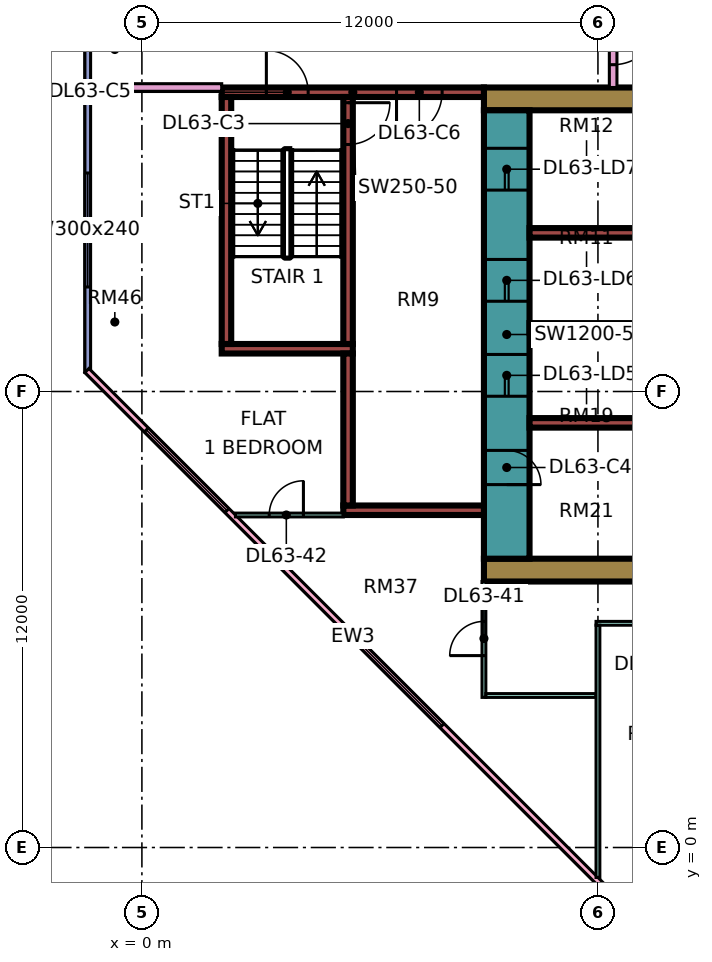
"""IFC4 building model, lengths in metres.
Left out: names, types, materials, properties, quantities, classifications, styles, units other than length and angle.
Written with IfcOpenShell. Run it as: python <this file> out.ifc"""

import sys

from ifc_helpers import new_model, si_unit, direction, frame, frame_2d, origin, place, context, subcontext, project, spatial, rectangle, extrude, element, fill, save


model = new_model("IFC4")
c1 = context("Model", 3, precision=1e-05, world=origin(), true_north=direction((0.0, 1.0)))
c2 = subcontext(c1, "Body", "Model", "MODEL_VIEW")
j1 = project(units=[si_unit("LENGTHUNIT", "METRE"), si_unit("PLANEANGLEUNIT", "RADIAN")], contexts=[c1])
p1 = place(None, origin())
s1 = spatial("IfcSite", under=j1, at=p1, CompositionType="ELEMENT")
p2 = place(p1, origin())
s2 = spatial("IfcBuilding", under=s1, at=p2, CompositionType="ELEMENT")
p3 = place(p2, frame((0.0, 0.0, 273.4)))
s3 = spatial("IfcBuildingStorey", under=s2, at=p3, CompositionType="ELEMENT", Elevation=273.4)
p4 = place(p3, frame((9.0, 7.3, 0.0), z_axis=(0.0, 0.0, 1.0), x_axis=(1.0, 0.0, 0.0)))
e1 = element("IfcWall", 1, at=p4, inside=s3, PredefinedType="SHEAR", context=c2, shape_type="SweptSolid", body=[
    extrude(rectangle(XDim=25.0, YDim=0.6, at=frame_2d((12.5, 0.0))), origin(), (0.0, 0.0, 1.0), 3.75),
])
p5 = place(p3, frame((9.0, 19.7, 0.0), z_axis=(0.0, 0.0, 1.0), x_axis=(1.0, 0.0, 0.0)))
e2 = element("IfcWall", 2, at=p5, inside=s3, PredefinedType="SHEAR", context=c2, shape_type="SweptSolid", body=[
    extrude(rectangle(XDim=25.0, YDim=0.6, at=frame_2d((12.5, 0.0))), origin(), (0.0, 0.0, 1.0), 3.75),
])
p6 = place(p5, frame((19.1, 0.0, 0.0)))
e3 = element("IfcOpeningElement", 3, at=p6, cuts=e2, PredefinedType="OPENING", context=c2, shape_type="SweptSolid", body=[
    extrude(rectangle(XDim=1.8, YDim=2.4, at=frame_2d((0.9, 1.2))), frame((0.0, 0.31, 0.0), z_axis=(0.0, -1.0, 0.0), x_axis=(1.0, 0.0, 0.0)), (0.0, 0.0, 1.0), 0.62),
])
p7 = place(p3, frame((9.6, 7.6, 0.0), z_axis=(0.0, 0.0, 1.0), x_axis=(0.0, 1.0, 0.0)))
e4 = element("IfcWall", 4, at=p7, inside=s3, PredefinedType="SHEAR", context=c2, shape_type="SweptSolid", body=[
    extrude(rectangle(XDim=11.8, YDim=1.2, at=frame_2d((5.9, 0.0))), origin(), (0.0, 0.0, 1.0), 3.75),
])
p8 = place(p7, frame((4.275, 0.0, 0.0)))
e5 = element("IfcOpeningElement", 5, at=p8, cuts=e4, PredefinedType="OPENING", context=c2, shape_type="SweptSolid", body=[
    extrude(rectangle(XDim=1.1, YDim=2.2, at=frame_2d((0.55, 1.1))), frame((0.0, 0.61, 0.0), z_axis=(0.0, -1.0, 0.0), x_axis=(1.0, 0.0, 0.0)), (0.0, 0.0, 1.0), 1.22),
])
p9 = place(p7, frame((6.775, 0.0, 0.0)))
e6 = element("IfcOpeningElement", 6, at=p9, cuts=e4, PredefinedType="OPENING", context=c2, shape_type="SweptSolid", body=[
    extrude(rectangle(XDim=1.1, YDim=2.2, at=frame_2d((0.55, 1.1))), frame((0.0, 0.61, 0.0), z_axis=(0.0, -1.0, 0.0), x_axis=(1.0, 0.0, 0.0)), (0.0, 0.0, 1.0), 1.22),
])
p10 = place(p7, frame((9.7, 0.0, 0.0)))
e7 = element("IfcOpeningElement", 7, at=p10, cuts=e4, PredefinedType="OPENING", context=c2, shape_type="SweptSolid", body=[
    extrude(rectangle(XDim=1.1, YDim=2.2, at=frame_2d((0.55, 1.1))), frame((0.0, 0.61, 0.0), z_axis=(0.0, -1.0, 0.0), x_axis=(1.0, 0.0, 0.0)), (0.0, 0.0, 1.0), 1.22),
])
p11 = place(p7, frame((1.95, 0.0, 0.0)))
e8 = element("IfcOpeningElement", 8, at=p11, cuts=e4, PredefinedType="OPENING", context=c2, shape_type="SweptSolid", body=[
    extrude(rectangle(XDim=0.9, YDim=2.1, at=frame_2d((0.45, 1.05))), frame((0.0, 0.61, 0.0), z_axis=(0.0, -1.0, 0.0), x_axis=(1.0, 0.0, 0.0)), (0.0, 0.0, 1.0), 1.22),
])
for number, where, z_axis, x_axis in (
    (9, (10.2, 11.175, 0.0), (0.0, 0.0, 1.0), (1.0, 0.0, 0.0)),
    (10, (10.2, 13.675, 0.0), (0.0, 0.0, 1.0), (1.0, 0.0, 0.0)),
    (11, (10.2, 16.175, 0.0), (0.0, 0.0, 1.0), (1.0, 0.0, 0.0)),
):
    element("IfcWall", number, at=place(p3, frame(where, z_axis=z_axis, x_axis=x_axis)), inside=s3, PredefinedType="SHEAR", context=c2, shape_type="SweptSolid", body=[
        extrude(rectangle(XDim=3.0, YDim=0.25, at=frame_2d((1.5, 0.0))), origin(), (0.0, 0.0, 1.0), 3.75),
    ])
p12 = place(p3, frame((2.1, 19.875, 0.0), z_axis=(0.0, 0.0, 1.0), x_axis=(1.0, 0.0, 0.0)))
e12 = element("IfcWall", 12, at=p12, inside=s3, PredefinedType="SHEAR", context=c2, shape_type="SweptSolid", body=[
    extrude(rectangle(XDim=6.9, YDim=0.25, at=frame_2d((3.45, 0.0))), origin(), (0.0, 0.0, 1.0), 3.75),
])
p13 = place(p12, frame((1.175, 0.0, 0.0)))
e13 = element("IfcOpeningElement", 13, at=p13, cuts=e12, PredefinedType="OPENING", context=c2, shape_type="SweptSolid", body=[
    extrude(rectangle(XDim=1.1, YDim=2.2, at=frame_2d((0.55, 1.1))), frame((0.0, 0.135, 0.0), z_axis=(0.0, -1.0, 0.0), x_axis=(1.0, 0.0, 0.0)), (0.0, 0.0, 1.0), 0.27),
])
p14 = place(p12, frame((4.6, 0.0, 0.0)))
e14 = element("IfcOpeningElement", 14, at=p14, cuts=e12, PredefinedType="OPENING", context=c2, shape_type="SweptSolid", body=[
    extrude(rectangle(XDim=1.2, YDim=2.2, at=frame_2d((0.6, 1.1))), frame((0.0, 0.135, 0.0), z_axis=(0.0, -1.0, 0.0), x_axis=(1.0, 0.0, 0.0)), (0.0, 0.0, 1.0), 0.27),
])
p15 = place(p3, frame((2.1, 13.125, 0.0), z_axis=(0.0, 0.0, 1.0), x_axis=(1.0, 0.0, 0.0)))
e15 = element("IfcWall", 15, at=p15, inside=s3, PredefinedType="SHEAR", context=c2, shape_type="SweptSolid", body=[
    extrude(rectangle(XDim=3.45, YDim=0.25, at=frame_2d((1.725, 0.0))), origin(), (0.0, 0.0, 1.0), 3.75),
])
p16 = place(p3, frame((2.225, 13.25, 0.0), z_axis=(0.0, 0.0, 1.0), x_axis=(0.0, 1.0, 0.0)))
e16 = element("IfcWall", 16, at=p16, inside=s3, PredefinedType="SHEAR", context=c2, shape_type="SweptSolid", body=[
    extrude(rectangle(XDim=6.5, YDim=0.25, at=frame_2d((3.25, 0.0))), origin(), (0.0, 0.0, 1.0), 3.75),
])
p17 = place(p3, frame((5.425, 13.25, 0.0), z_axis=(0.0, 0.0, 1.0), x_axis=(0.0, 1.0, 0.0)))
e17 = element("IfcWall", 17, at=p17, inside=s3, PredefinedType="SHEAR", context=c2, shape_type="SweptSolid", body=[
    extrude(rectangle(XDim=6.5, YDim=0.25, at=frame_2d((3.25, 0.0))), origin(), (0.0, 0.0, 1.0), 3.75),
])
p18 = place(p17, frame((5.25, 0.0, 0.0)))
e18 = element("IfcOpeningElement", 18, at=p18, cuts=e17, PredefinedType="OPENING", context=c2, shape_type="SweptSolid", body=[
    extrude(rectangle(XDim=1.1, YDim=2.2, at=frame_2d((0.55, 1.1))), frame((0.0, 0.135, 0.0), z_axis=(0.0, -1.0, 0.0), x_axis=(1.0, 0.0, 0.0)), (0.0, 0.0, 1.0), 0.27),
])
p19 = place(p3, frame((5.3, 8.875, 0.0), z_axis=(0.0, 0.0, 1.0), x_axis=(1.0, 0.0, 0.0)))
e19 = element("IfcWall", 19, at=p19, inside=s3, PredefinedType="SHEAR", context=c2, shape_type="SweptSolid", body=[
    extrude(rectangle(XDim=3.7, YDim=0.25, at=frame_2d((1.85, 0.0))), origin(), (0.0, 0.0, 1.0), 3.75),
])
p20 = place(p3, frame((5.425, 9.0, 0.0), z_axis=(0.0, 0.0, 1.0), x_axis=(0.0, 1.0, 0.0)))
e20 = element("IfcWall", 20, at=p20, inside=s3, PredefinedType="SHEAR", context=c2, shape_type="SweptSolid", body=[
    extrude(rectangle(XDim=4.0, YDim=0.25, at=frame_2d((2.0, 0.0))), origin(), (0.0, 0.0, 1.0), 3.75),
])
p21 = place(p3, frame((-1.425, 23.925, 0.0), z_axis=(0.0, 0.0, 1.0), x_axis=(0.0, -1.0, 0.0)))
e21 = element("IfcWall", 21, at=p21, inside=s3, PredefinedType="SOLIDWALL", context=c2, shape_type="SweptSolid", body=[
    extrude(rectangle(XDim=11.425, YDim=0.15, at=frame_2d((5.712, 0.0))), origin(), (0.0, 0.0, 1.0), 3.35),
])
p22 = place(p21, frame((6.175, 0.0, 0.45)))
e22 = element("IfcOpeningElement", 22, at=p22, cuts=e21, PredefinedType="OPENING", context=c2, shape_type="SweptSolid", body=[
    extrude(rectangle(XDim=3.0, YDim=2.4, at=frame_2d((1.5, 1.2))), frame((0.0, 0.085, 0.0), z_axis=(0.0, -1.0, 0.0), x_axis=(1.0, 0.0, 0.0)), (0.0, 0.0, 1.0), 0.17),
])
p23 = place(p3, frame((-1.447, 12.553, 0.0), z_axis=(0.0, 0.0, 1.0), x_axis=(0.707106781187, -0.707106781187, 0.0)))
e23 = element("IfcWall", 23, at=p23, inside=s3, PredefinedType="SOLIDWALL", context=c2, shape_type="SweptSolid", body=[
    extrude(rectangle(XDim=19.799, YDim=0.15, at=frame_2d((9.899, 0.0))), origin(), (0.0, 0.0, 1.0), 3.35),
])
p24 = place(p23, frame((2.212, 0.0, 0.45)))
e24 = element("IfcOpeningElement", 24, at=p24, cuts=e23, PredefinedType="OPENING", context=c2, shape_type="SweptSolid", body=[
    extrude(rectangle(XDim=3.0, YDim=2.4, at=frame_2d((1.5, 1.2))), frame((0.0, 0.085, 0.0), z_axis=(0.0, -1.0, 0.0), x_axis=(1.0, 0.0, 0.0)), (0.0, 0.0, 1.0), 0.17),
])
p25 = place(p23, frame((10.216, 0.0, 0.45)))
e25 = element("IfcOpeningElement", 25, at=p25, cuts=e23, PredefinedType="OPENING", context=c2, shape_type="SweptSolid", body=[
    extrude(rectangle(XDim=3.0, YDim=2.4, at=frame_2d((1.5, 1.2))), frame((0.0, 0.085, 0.0), z_axis=(0.0, -1.0, 0.0), x_axis=(1.0, 0.0, 0.0)), (0.0, 0.0, 1.0), 0.17),
])
p26 = place(p3, frame((-1.35, 20.0, 0.0), z_axis=(0.0, 0.0, 1.0), x_axis=(1.0, 0.0, 0.0)))
e26 = element("IfcWall", 26, at=p26, inside=s3, PredefinedType="PARTITIONING", context=c2, shape_type="SweptSolid", body=[
    extrude(rectangle(XDim=3.45, YDim=0.2, at=frame_2d((1.725, 0.0))), origin(), (0.0, 0.0, 1.0), 3.35),
])
p27 = place(p3, frame((2.461, 8.75, 0.0), z_axis=(0.0, 0.0, 1.0), x_axis=(1.0, 0.0, 0.0)))
e27 = element("IfcWall", 27, at=p27, inside=s3, PredefinedType="PARTITIONING", context=c2, shape_type="SweptSolid", body=[
    extrude(rectangle(XDim=2.839, YDim=0.1, at=frame_2d((1.419, 0.0))), origin(), (0.0, 0.0, 1.0), 3.35),
])
p28 = place(p27, frame((0.889, 0.0, 0.0)))
e28 = element("IfcOpeningElement", 28, at=p28, cuts=e27, PredefinedType="OPENING", context=c2, shape_type="SweptSolid", body=[
    extrude(rectangle(XDim=0.9, YDim=2.1, at=frame_2d((0.45, 1.05))), frame((0.0, 0.06, 0.0), z_axis=(0.0, -1.0, 0.0), x_axis=(1.0, 0.0, 0.0)), (0.0, 0.0, 1.0), 0.12),
])
p29 = place(p3, frame((9.0, 3.95, 0.0), z_axis=(0.0, 0.0, 1.0), x_axis=(0.0, 1.0, 0.0)))
e29 = element("IfcWall", 29, at=p29, inside=s3, PredefinedType="PARTITIONING", context=c2, shape_type="SweptSolid", body=[
    extrude(rectangle(XDim=3.05, YDim=0.1, at=frame_2d((1.525, 0.0))), origin(), (0.0, 0.0, 1.0), 3.35),
])
p30 = place(p29, frame((1.1, 0.0, 0.0)))
e30 = element("IfcOpeningElement", 30, at=p30, cuts=e29, PredefinedType="OPENING", context=c2, shape_type="SweptSolid", body=[
    extrude(rectangle(XDim=0.9, YDim=2.1, at=frame_2d((0.45, 1.05))), frame((0.0, 0.06, 0.0), z_axis=(0.0, -1.0, 0.0), x_axis=(1.0, 0.0, 0.0)), (0.0, 0.0, 1.0), 0.12),
])
p31 = place(p3, frame((9.05, 4.0, 0.0), z_axis=(0.0, 0.0, 1.0), x_axis=(1.0, 0.0, 0.0)))
e31 = element("IfcWall", 31, at=p31, inside=s3, PredefinedType="PARTITIONING", context=c2, shape_type="SweptSolid", body=[
    extrude(rectangle(XDim=2.9, YDim=0.1, at=frame_2d((1.45, 0.0))), origin(), (0.0, 0.0, 1.0), 3.35),
])
p32 = place(p3, frame((11.95, 5.9, 0.0), z_axis=(0.0, 0.0, 1.0), x_axis=(1.0, 0.0, 0.0)))
e32 = element("IfcWall", 32, at=p32, inside=s3, PredefinedType="PARTITIONING", context=c2, shape_type="SweptSolid", body=[
    extrude(rectangle(XDim=21.1, YDim=0.1, at=frame_2d((10.55, 0.0))), origin(), (0.0, 0.0, 1.0), 3.35),
])
p33 = place(p32, frame((1.1, 0.0, 0.0)))
e33 = element("IfcOpeningElement", 33, at=p33, cuts=e32, PredefinedType="OPENING", context=c2, shape_type="SweptSolid", body=[
    extrude(rectangle(XDim=0.9, YDim=2.1, at=frame_2d((0.45, 1.05))), frame((0.0, 0.06, 0.0), z_axis=(0.0, -1.0, 0.0), x_axis=(1.0, 0.0, 0.0)), (0.0, 0.0, 1.0), 0.12),
])
p34 = place(p32, frame((4.1, 0.0, 0.0)))
e34 = element("IfcOpeningElement", 34, at=p34, cuts=e32, PredefinedType="OPENING", context=c2, shape_type="SweptSolid", body=[
    extrude(rectangle(XDim=0.9, YDim=2.1, at=frame_2d((0.45, 1.05))), frame((0.0, 0.06, 0.0), z_axis=(0.0, -1.0, 0.0), x_axis=(1.0, 0.0, 0.0)), (0.0, 0.0, 1.0), 0.12),
])
p35 = place(p32, frame((7.1, 0.0, 0.0)))
e35 = element("IfcOpeningElement", 35, at=p35, cuts=e32, PredefinedType="OPENING", context=c2, shape_type="SweptSolid", body=[
    extrude(rectangle(XDim=0.9, YDim=2.1, at=frame_2d((0.45, 1.05))), frame((0.0, 0.06, 0.0), z_axis=(0.0, -1.0, 0.0), x_axis=(1.0, 0.0, 0.0)), (0.0, 0.0, 1.0), 0.12),
])
p36 = place(p32, frame((10.1, 0.0, 0.0)))
e36 = element("IfcOpeningElement", 36, at=p36, cuts=e32, PredefinedType="OPENING", context=c2, shape_type="SweptSolid", body=[
    extrude(rectangle(XDim=0.9, YDim=2.1, at=frame_2d((0.45, 1.05))), frame((0.0, 0.06, 0.0), z_axis=(0.0, -1.0, 0.0), x_axis=(1.0, 0.0, 0.0)), (0.0, 0.0, 1.0), 0.12),
])
p37 = place(p32, frame((16.1, 0.0, 0.0)))
e37 = element("IfcOpeningElement", 37, at=p37, cuts=e32, PredefinedType="OPENING", context=c2, shape_type="SweptSolid", body=[
    extrude(rectangle(XDim=0.9, YDim=2.1, at=frame_2d((0.45, 1.05))), frame((0.0, 0.06, 0.0), z_axis=(0.0, -1.0, 0.0), x_axis=(1.0, 0.0, 0.0)), (0.0, 0.0, 1.0), 0.12),
])
p38 = place(p3, frame((12.0, -0.788, 0.0), z_axis=(0.0, 0.0, 1.0), x_axis=(0.0, 1.0, 0.0)))
e38 = element("IfcWall", 38, at=p38, inside=s3, PredefinedType="PARTITIONING", context=c2, shape_type="SweptSolid", body=[
    extrude(rectangle(XDim=6.638, YDim=0.1, at=frame_2d((3.319, 0.0))), origin(), (0.0, 0.0, 1.0), 3.35),
])
p39 = place(p3, frame((12.4, 20.0, 0.0), z_axis=(0.0, 0.0, 1.0), x_axis=(0.0, 1.0, 0.0)))
e39 = element("IfcWall", 39, at=p39, inside=s3, PredefinedType="PARTITIONING", context=c2, shape_type="SweptSolid", body=[
    extrude(rectangle(XDim=34.0, YDim=0.2, at=frame_2d((17.0, 0.0))), origin(), (0.0, 0.0, 1.0), 3.35),
])
p40 = place(p39, frame((16.95, 0.0, 0.0)))
e40 = element("IfcOpeningElement", 40, at=p40, cuts=e39, PredefinedType="OPENING", context=c2, shape_type="SweptSolid", body=[
    extrude(rectangle(XDim=1.0, YDim=2.1, at=frame_2d((0.5, 1.05))), frame((0.0, 0.11, 0.0), z_axis=(0.0, -1.0, 0.0), x_axis=(1.0, 0.0, 0.0)), (0.0, 0.0, 1.0), 0.22),
])
p41 = place(p39, frame((0.6, 0.0, 0.0)))
e41 = element("IfcOpeningElement", 41, at=p41, cuts=e39, PredefinedType="OPENING", context=c2, shape_type="SweptSolid", body=[
    extrude(rectangle(XDim=1.2, YDim=2.1, at=frame_2d((0.6, 1.05))), frame((0.0, 0.11, 0.0), z_axis=(0.0, -1.0, 0.0), x_axis=(1.0, 0.0, 0.0)), (0.0, 0.0, 1.0), 0.22),
])
p42 = place(p39, frame((13.65, 0.0, 0.0)))
e42 = element("IfcOpeningElement", 42, at=p42, cuts=e39, PredefinedType="OPENING", context=c2, shape_type="SweptSolid", body=[
    extrude(rectangle(XDim=1.0, YDim=2.1, at=frame_2d((0.5, 1.05))), frame((0.0, 0.11, 0.0), z_axis=(0.0, -1.0, 0.0), x_axis=(1.0, 0.0, 0.0)), (0.0, 0.0, 1.0), 0.22),
])
p43 = place(p22, origin())
e43 = element("IfcWindow", 43, at=p43, inside=s3, PartitioningType="SINGLE_PANEL", PredefinedType="WINDOW", context=c2, shape_type="SweptSolid", body=[
    extrude(rectangle(XDim=3.0, YDim=2.4, at=frame_2d((1.5, 1.2))), frame((0.0, 0.03, 0.0), z_axis=(0.0, -1.0, 0.0), x_axis=(1.0, 0.0, 0.0)), (0.0, 0.0, 1.0), 0.06),
])
fill(e22, e43)
p44 = place(p24, origin())
e44 = element("IfcWindow", 44, at=p44, inside=s3, PartitioningType="SINGLE_PANEL", PredefinedType="WINDOW", context=c2, shape_type="SweptSolid", body=[
    extrude(rectangle(XDim=3.0, YDim=2.4, at=frame_2d((1.5, 1.2))), frame((0.0, 0.03, 0.0), z_axis=(0.0, -1.0, 0.0), x_axis=(1.0, 0.0, 0.0)), (0.0, 0.0, 1.0), 0.06),
])
fill(e24, e44)
p45 = place(p25, origin())
e45 = element("IfcWindow", 45, at=p45, inside=s3, PartitioningType="SINGLE_PANEL", PredefinedType="WINDOW", context=c2, shape_type="SweptSolid", body=[
    extrude(rectangle(XDim=3.0, YDim=2.4, at=frame_2d((1.5, 1.2))), frame((0.0, 0.03, 0.0), z_axis=(0.0, -1.0, 0.0), x_axis=(1.0, 0.0, 0.0)), (0.0, 0.0, 1.0), 0.06),
])
fill(e25, e45)
p46 = place(p8, origin())
e46 = element("IfcDoor", 46, at=p46, inside=s3, OperationType="DOUBLE_DOOR_SLIDING", PredefinedType="DOOR", context=c2, shape_type="SweptSolid", body=[
    extrude(rectangle(XDim=1.1, YDim=2.2, at=frame_2d((0.55, 1.1))), frame((0.0, 0.025, 0.0), z_axis=(0.0, -1.0, 0.0), x_axis=(1.0, 0.0, 0.0)), (0.0, 0.0, 1.0), 0.05),
])
fill(e5, e46)
p47 = place(p9, origin())
e47 = element("IfcDoor", 47, at=p47, inside=s3, OperationType="DOUBLE_DOOR_SLIDING", PredefinedType="DOOR", context=c2, shape_type="SweptSolid", body=[
    extrude(rectangle(XDim=1.1, YDim=2.2, at=frame_2d((0.55, 1.1))), frame((0.0, 0.025, 0.0), z_axis=(0.0, -1.0, 0.0), x_axis=(1.0, 0.0, 0.0)), (0.0, 0.0, 1.0), 0.05),
])
fill(e6, e47)
p48 = place(p10, origin())
e48 = element("IfcDoor", 48, at=p48, inside=s3, OperationType="DOUBLE_DOOR_SLIDING", PredefinedType="DOOR", context=c2, shape_type="SweptSolid", body=[
    extrude(rectangle(XDim=1.1, YDim=2.2, at=frame_2d((0.55, 1.1))), frame((0.0, 0.025, 0.0), z_axis=(0.0, -1.0, 0.0), x_axis=(1.0, 0.0, 0.0)), (0.0, 0.0, 1.0), 0.05),
])
fill(e7, e48)
p49 = place(p18, origin())
e49 = element("IfcDoor", 49, at=p49, inside=s3, OperationType="SINGLE_SWING_RIGHT", PredefinedType="DOOR", context=c2, shape_type="SweptSolid", body=[
    extrude(rectangle(XDim=1.1, YDim=2.2, at=frame_2d((0.55, 1.1))), frame((0.0, 0.025, 0.0), z_axis=(0.0, -1.0, 0.0), x_axis=(1.0, 0.0, 0.0)), (0.0, 0.0, 1.0), 0.05),
])
fill(e18, e49)
p50 = place(p11, frame((0.9, 0.0, 0.0), z_axis=(0.0, 0.0, 1.0), x_axis=(-1.0, 0.0, 0.0)))
e50 = element("IfcDoor", 50, at=p50, inside=s3, OperationType="SINGLE_SWING_LEFT", PredefinedType="DOOR", context=c2, shape_type="SweptSolid", body=[
    extrude(rectangle(XDim=0.9, YDim=2.1, at=frame_2d((0.45, 1.05))), frame((0.0, 0.025, 0.0), z_axis=(0.0, -1.0, 0.0), x_axis=(1.0, 0.0, 0.0)), (0.0, 0.0, 1.0), 0.05),
])
fill(e8, e50)
p51 = place(p13, origin())
e51 = element("IfcDoor", 51, at=p51, inside=s3, OperationType="SINGLE_SWING_LEFT", PredefinedType="DOOR", context=c2, shape_type="SweptSolid", body=[
    extrude(rectangle(XDim=1.1, YDim=2.2, at=frame_2d((0.55, 1.1))), frame((0.0, 0.025, 0.0), z_axis=(0.0, -1.0, 0.0), x_axis=(1.0, 0.0, 0.0)), (0.0, 0.0, 1.0), 0.05),
])
fill(e13, e51)
p52 = place(p14, frame((1.2, 0.0, 0.0), z_axis=(0.0, 0.0, 1.0), x_axis=(-1.0, 0.0, 0.0)))
e52 = element("IfcDoor", 52, at=p52, inside=s3, OperationType="SINGLE_SWING_LEFT", PredefinedType="DOOR", context=c2, shape_type="SweptSolid", body=[
    extrude(rectangle(XDim=1.2, YDim=2.2, at=frame_2d((0.6, 1.1))), frame((0.0, 0.025, 0.0), z_axis=(0.0, -1.0, 0.0), x_axis=(1.0, 0.0, 0.0)), (0.0, 0.0, 1.0), 0.05),
])
fill(e14, e52)
p53 = place(p41, origin())
e53 = element("IfcDoor", 53, at=p53, inside=s3, OperationType="SINGLE_SWING_RIGHT", PredefinedType="DOOR", context=c2, shape_type="SweptSolid", body=[
    extrude(rectangle(XDim=1.2, YDim=2.1, at=frame_2d((0.6, 1.05))), frame((0.0, 0.025, 0.0), z_axis=(0.0, -1.0, 0.0), x_axis=(1.0, 0.0, 0.0)), (0.0, 0.0, 1.0), 0.05),
])
fill(e41, e53)
p54 = place(p30, origin())
e54 = element("IfcDoor", 54, at=p54, inside=s3, OperationType="SINGLE_SWING_LEFT", PredefinedType="DOOR", context=c2, shape_type="SweptSolid", body=[
    extrude(rectangle(XDim=0.9, YDim=2.1, at=frame_2d((0.45, 1.05))), frame((0.0, 0.025, 0.0), z_axis=(0.0, -1.0, 0.0), x_axis=(1.0, 0.0, 0.0)), (0.0, 0.0, 1.0), 0.05),
])
fill(e30, e54)
p55 = place(p28, frame((0.9, 0.0, 0.0), z_axis=(0.0, 0.0, 1.0), x_axis=(-1.0, 0.0, 0.0)))
e55 = element("IfcDoor", 55, at=p55, inside=s3, OperationType="SINGLE_SWING_RIGHT", PredefinedType="DOOR", context=c2, shape_type="SweptSolid", body=[
    extrude(rectangle(XDim=0.9, YDim=2.1, at=frame_2d((0.45, 1.05))), frame((0.0, 0.025, 0.0), z_axis=(0.0, -1.0, 0.0), x_axis=(1.0, 0.0, 0.0)), (0.0, 0.0, 1.0), 0.05),
])
fill(e28, e55)
save(model, sys.argv[1])
